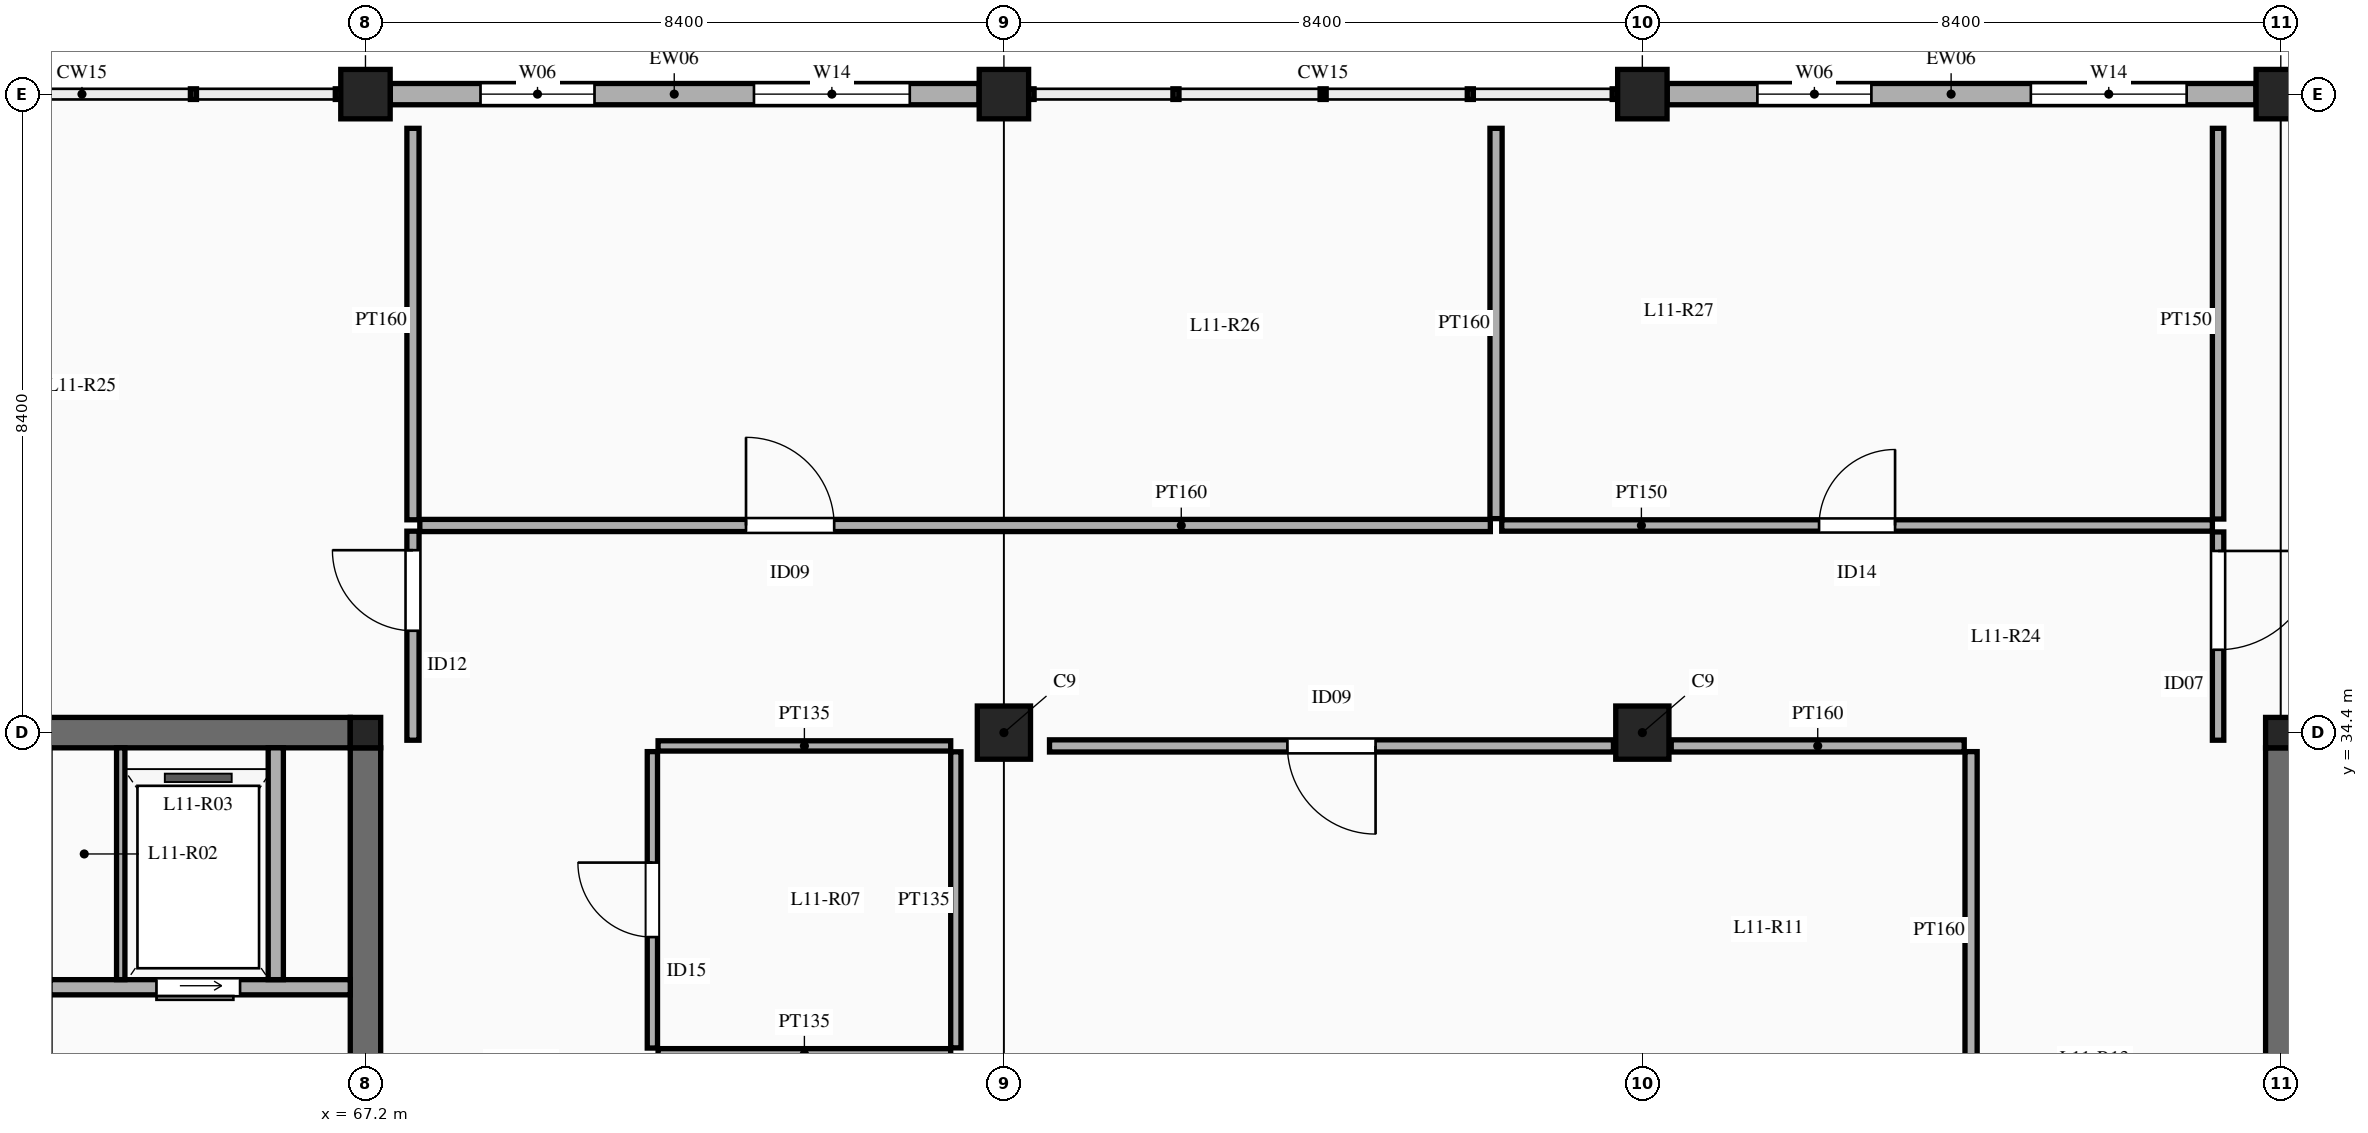
"""IFC4 building model, lengths in metres.
Left out: names, types, materials, properties, quantities, classifications, styles, units other than length and angle.
Written with IfcOpenShell. Run it as: python <this file> out.ifc"""

import sys

from ifc_helpers import new_model, si_unit, direction, frame, frame_2d, origin, origin_2d, place, context, subcontext, project, spatial, rectangle, extrude, element, fill, save


model = new_model("IFC4")
c1 = context("Model", 3, precision=1e-05, world=origin(), true_north=direction((0.0, 1.0)))
c2 = subcontext(c1, "Body", "Model", "MODEL_VIEW")
j1 = project(units=[si_unit("LENGTHUNIT", "METRE"), si_unit("PLANEANGLEUNIT", "RADIAN")], contexts=[c1])
p1 = place(None, origin())
s1 = spatial("IfcSite", under=j1, at=p1, CompositionType="ELEMENT")
p2 = place(p1, origin())
s2 = spatial("IfcBuilding", under=s1, at=p2, CompositionType="ELEMENT")
p3 = place(p2, frame((0.0, 0.0, 51.0)))
s3 = spatial("IfcBuildingStorey", under=s2, at=p3, CompositionType="ELEMENT", Elevation=51.0)
p4 = place(p3, frame((67.2, 34.4, 0.0), z_axis=(0.0, 0.0, 1.0), x_axis=(1.0, 0.0, 0.0)))
e1 = element("IfcColumn", 1, at=p4, inside=s3, PredefinedType="COLUMN", context=c2, shape_type="SweptSolid", body=[
    extrude(rectangle(XDim=0.4, YDim=0.4, at=origin_2d()), origin(), (0.0, 0.0, 1.0), 4.5),
])
p5 = place(p3, frame((67.2, 42.8, 0.0), z_axis=(0.0, 0.0, 1.0), x_axis=(1.0, 0.0, 0.0)))
e2 = element("IfcColumn", 2, at=p5, inside=s3, PredefinedType="COLUMN", context=c2, shape_type="SweptSolid", body=[
    extrude(rectangle(XDim=0.65, YDim=0.65, at=origin_2d()), origin(), (0.0, 0.0, 1.0), 4.5),
])
p6 = place(p3, frame((75.6, 34.4, 0.0), z_axis=(0.0, 0.0, 1.0), x_axis=(1.0, 0.0, 0.0)))
e3 = element("IfcColumn", 3, at=p6, inside=s3, PredefinedType="COLUMN", context=c2, shape_type="SweptSolid", body=[
    extrude(rectangle(XDim=0.7, YDim=0.7, at=origin_2d()), origin(), (0.0, 0.0, 1.0), 4.5),
])
p7 = place(p3, frame((75.6, 42.8, 0.0), z_axis=(0.0, 0.0, 1.0), x_axis=(1.0, 0.0, 0.0)))
e4 = element("IfcColumn", 4, at=p7, inside=s3, PredefinedType="COLUMN", context=c2, shape_type="SweptSolid", body=[
    extrude(rectangle(XDim=0.65, YDim=0.65, at=origin_2d()), origin(), (0.0, 0.0, 1.0), 4.5),
])
p8 = place(p3, frame((84.0, 34.4, 0.0), z_axis=(0.0, 0.0, 1.0), x_axis=(1.0, 0.0, 0.0)))
e5 = element("IfcColumn", 5, at=p8, inside=s3, PredefinedType="COLUMN", context=c2, shape_type="SweptSolid", body=[
    extrude(rectangle(XDim=0.7, YDim=0.7, at=origin_2d()), origin(), (0.0, 0.0, 1.0), 4.5),
])
p9 = place(p3, frame((84.0, 42.8, 0.0), z_axis=(0.0, 0.0, 1.0), x_axis=(1.0, 0.0, 0.0)))
e6 = element("IfcColumn", 6, at=p9, inside=s3, PredefinedType="COLUMN", context=c2, shape_type="SweptSolid", body=[
    extrude(rectangle(XDim=0.65, YDim=0.65, at=origin_2d()), origin(), (0.0, 0.0, 1.0), 4.5),
])
p10 = place(p3, frame((92.4, 34.4, 0.0), z_axis=(0.0, 0.0, 1.0), x_axis=(1.0, 0.0, 0.0)))
e7 = element("IfcColumn", 7, at=p10, inside=s3, PredefinedType="COLUMN", context=c2, shape_type="SweptSolid", body=[
    extrude(rectangle(XDim=0.4, YDim=0.4, at=origin_2d()), origin(), (0.0, 0.0, 1.0), 4.5),
])
p11 = place(p3, frame((92.4, 42.8, 0.0), z_axis=(0.0, 0.0, 1.0), x_axis=(1.0, 0.0, 0.0)))
e8 = element("IfcColumn", 8, at=p11, inside=s3, PredefinedType="COLUMN", context=c2, shape_type="SweptSolid", body=[
    extrude(rectangle(XDim=0.65, YDim=0.65, at=origin_2d()), origin(), (0.0, 0.0, 1.0), 4.5),
])
for number, where, z_axis, x_axis in (
    (9, (67.2, 26.2, 0.0), (0.0, 0.0, 1.0), (0.0, 1.0, 0.0)),
    (10, (59.0, 34.4, 0.0), (0.0, 0.0, 1.0), (1.0, 0.0, 0.0)),
    (11, (92.4, 26.2, 0.0), (0.0, 0.0, 1.0), (0.0, 1.0, 0.0)),
):
    element("IfcWall", number, at=place(p3, frame(where, z_axis=z_axis, x_axis=x_axis)), inside=s3, PredefinedType="SHEAR", context=c2, shape_type="SweptSolid", body=[
        extrude(rectangle(XDim=8.0, YDim=0.4, at=frame_2d((4.0, 0.0))), origin(), (0.0, 0.0, 1.0), 4.5),
    ])
p12 = place(p3, frame((67.527, 42.8, 0.0), z_axis=(0.0, 0.0, 1.0), x_axis=(1.0, 0.0, 0.0)))
e12 = element("IfcWall", 12, at=p12, inside=s3, PredefinedType="ELEMENTEDWALL", context=c2, shape_type="SweptSolid", body=[
    extrude(rectangle(XDim=7.746, YDim=0.28, at=frame_2d((3.873, 0.0))), origin(), (0.0, 0.0, 1.0), 3.55),
])
p13 = place(p12, frame((1.187, 0.0, 0.9)))
e13 = element("IfcOpeningElement", 13, at=p13, cuts=e12, PredefinedType="OPENING", context=c2, shape_type="SweptSolid", body=[
    extrude(rectangle(XDim=1.5, YDim=2.0, at=frame_2d((0.75, 1.0))), frame((0.0, 0.15, 0.0), z_axis=(0.0, -1.0, 0.0), x_axis=(1.0, 0.0, 0.0)), (0.0, 0.0, 1.0), 0.3),
])
p14 = place(p12, frame((4.784, 0.0, 0.9)))
e14 = element("IfcOpeningElement", 14, at=p14, cuts=e12, PredefinedType="OPENING", context=c2, shape_type="SweptSolid", body=[
    extrude(rectangle(XDim=2.05, YDim=2.1, at=frame_2d((1.025, 1.05))), frame((0.0, 0.15, 0.0), z_axis=(0.0, -1.0, 0.0), x_axis=(1.0, 0.0, 0.0)), (0.0, 0.0, 1.0), 0.3),
])
p15 = place(p3, frame((84.327, 42.8, 0.0), z_axis=(0.0, 0.0, 1.0), x_axis=(1.0, 0.0, 0.0)))
e15 = element("IfcWall", 15, at=p15, inside=s3, PredefinedType="ELEMENTEDWALL", context=c2, shape_type="SweptSolid", body=[
    extrude(rectangle(XDim=7.746, YDim=0.28, at=frame_2d((3.873, 0.0))), origin(), (0.0, 0.0, 1.0), 3.55),
])
p16 = place(p15, frame((1.187, 0.0, 0.9)))
e16 = element("IfcOpeningElement", 16, at=p16, cuts=e15, PredefinedType="OPENING", context=c2, shape_type="SweptSolid", body=[
    extrude(rectangle(XDim=1.5, YDim=2.0, at=frame_2d((0.75, 1.0))), frame((0.0, 0.15, 0.0), z_axis=(0.0, -1.0, 0.0), x_axis=(1.0, 0.0, 0.0)), (0.0, 0.0, 1.0), 0.3),
])
p17 = place(p15, frame((4.784, 0.0, 0.9)))
e17 = element("IfcOpeningElement", 17, at=p17, cuts=e15, PredefinedType="OPENING", context=c2, shape_type="SweptSolid", body=[
    extrude(rectangle(XDim=2.05, YDim=2.1, at=frame_2d((1.025, 1.05))), frame((0.0, 0.15, 0.0), z_axis=(0.0, -1.0, 0.0), x_axis=(1.0, 0.0, 0.0)), (0.0, 0.0, 1.0), 0.3),
])
p18 = place(p3, frame((63.05, 31.05, 0.0), z_axis=(0.0, 0.0, 1.0), x_axis=(1.0, 0.0, 0.0)))
e18 = element("IfcWall", 18, at=p18, inside=s3, PredefinedType="SOLIDWALL", context=c2, shape_type="SweptSolid", body=[
    extrude(rectangle(XDim=3.95, YDim=0.2, at=frame_2d((1.975, 0.0))), origin(), (0.0, 0.0, 1.0), 4.3),
])
p19 = place(p18, frame((1.4, 0.0, 0.0)))
e19 = element("IfcOpeningElement", 19, at=p19, cuts=e18, PredefinedType="OPENING", context=c2, shape_type="SweptSolid", body=[
    extrude(rectangle(XDim=1.1, YDim=2.15, at=frame_2d((0.55, 1.075))), frame((0.0, 0.11, 0.0), z_axis=(0.0, -1.0, 0.0), x_axis=(1.0, 0.0, 0.0)), (0.0, 0.0, 1.0), 0.22),
])
p20 = place(p3, frame((63.98, 31.15, 0.0), z_axis=(0.0, 0.0, 1.0), x_axis=(0.0, 1.0, 0.0)))
e20 = element("IfcWall", 20, at=p20, inside=s3, PredefinedType="PARTITIONING", context=c2, shape_type="SweptSolid", body=[
    extrude(rectangle(XDim=3.05, YDim=0.11, at=frame_2d((1.525, 0.0))), origin(), (0.0, 0.0, 1.0), 4.3),
])
p21 = place(p3, frame((66.02, 31.15, 0.0), z_axis=(0.0, 0.0, 1.0), x_axis=(0.0, 1.0, 0.0)))
e21 = element("IfcWall", 21, at=p21, inside=s3, PredefinedType="SOLIDWALL", context=c2, shape_type="SweptSolid", body=[
    extrude(rectangle(XDim=3.05, YDim=0.2, at=frame_2d((1.525, 0.0))), origin(), (0.0, 0.0, 1.0), 4.3),
])
p22 = place(p3, frame((70.975, 30.25, 0.0), z_axis=(0.0, 0.0, 1.0), x_axis=(0.0, 1.0, 0.0)))
e22 = element("IfcWall", 22, at=p22, inside=s3, PredefinedType="PARTITIONING", context=c2, shape_type="SweptSolid", body=[
    extrude(rectangle(XDim=3.9, YDim=0.135, at=frame_2d((1.95, 0.0))), origin(), (0.0, 0.0, 1.0), 3.45),
])
p23 = place(p22, frame((1.46, 0.0, 0.0)))
e23 = element("IfcOpeningElement", 23, at=p23, cuts=e22, PredefinedType="OPENING", context=c2, shape_type="SweptSolid", body=[
    extrude(rectangle(XDim=0.98, YDim=2.15, at=frame_2d((0.49, 1.075))), frame((0.0, 0.077, 0.0), z_axis=(0.0, -1.0, 0.0), x_axis=(1.0, 0.0, 0.0)), (0.0, 0.0, 1.0), 0.155),
])
for number, where, z_axis, x_axis in (
    (24, (71.05, 30.175, 0.0), (0.0, 0.0, 1.0), (1.0, 0.0, 0.0)),
    (25, (71.05, 34.225, 0.0), (0.0, 0.0, 1.0), (1.0, 0.0, 0.0)),
):
    element("IfcWall", number, at=place(p3, frame(where, z_axis=z_axis, x_axis=x_axis)), inside=s3, PredefinedType="PARTITIONING", context=c2, shape_type="SweptSolid", body=[
        extrude(rectangle(XDim=3.85, YDim=0.135, at=frame_2d((1.925, 0.0))), origin(), (0.0, 0.0, 1.0), 3.45),
    ])
p24 = place(p3, frame((88.325, 29.45, 0.0), z_axis=(0.0, 0.0, 1.0), x_axis=(0.0, 1.0, 0.0)))
e26 = element("IfcWall", 26, at=p24, inside=s3, PredefinedType="PARTITIONING", context=c2, shape_type="SweptSolid", body=[
    extrude(rectangle(XDim=4.7, YDim=0.16, at=frame_2d((2.35, 0.0))), origin(), (0.0, 0.0, 1.0), 3.45),
])
p25 = place(p3, frame((76.2, 34.225, 0.0), z_axis=(0.0, 0.0, 1.0), x_axis=(1.0, 0.0, 0.0)))
e27 = element("IfcWall", 27, at=p25, inside=s3, PredefinedType="PARTITIONING", context=c2, shape_type="SweptSolid", body=[
    extrude(rectangle(XDim=7.42, YDim=0.16, at=frame_2d((3.71, 0.0))), origin(), (0.0, 0.0, 1.0), 3.45),
])
p26 = place(p25, frame((3.13, 0.0, 0.0)))
e28 = element("IfcOpeningElement", 28, at=p26, cuts=e27, PredefinedType="OPENING", context=c2, shape_type="SweptSolid", body=[
    extrude(rectangle(XDim=1.16, YDim=2.2, at=frame_2d((0.58, 1.1))), frame((0.0, 0.09, 0.0), z_axis=(0.0, -1.0, 0.0), x_axis=(1.0, 0.0, 0.0)), (0.0, 0.0, 1.0), 0.18),
])
p27 = place(p3, frame((84.38, 34.225, 0.0), z_axis=(0.0, 0.0, 1.0), x_axis=(1.0, 0.0, 0.0)))
e29 = element("IfcWall", 29, at=p27, inside=s3, PredefinedType="PARTITIONING", context=c2, shape_type="SweptSolid", body=[
    extrude(rectangle(XDim=3.855, YDim=0.16, at=frame_2d((1.928, 0.0))), origin(), (0.0, 0.0, 1.0), 3.45),
])
p28 = place(p3, frame((67.825, 34.3, 0.0), z_axis=(0.0, 0.0, 1.0), x_axis=(0.0, 1.0, 0.0)))
e30 = element("IfcWall", 30, at=p28, inside=s3, PredefinedType="PARTITIONING", context=c2, shape_type="SweptSolid", body=[
    extrude(rectangle(XDim=2.75, YDim=0.16, at=frame_2d((1.375, 0.0))), origin(), (0.0, 0.0, 1.0), 3.45),
])
p29 = place(p28, frame((1.44, 0.0, 0.0)))
e31 = element("IfcOpeningElement", 31, at=p29, cuts=e30, PredefinedType="OPENING", context=c2, shape_type="SweptSolid", body=[
    extrude(rectangle(XDim=1.06, YDim=2.18, at=frame_2d((0.53, 1.09))), frame((0.0, 0.09, 0.0), z_axis=(0.0, -1.0, 0.0), x_axis=(1.0, 0.0, 0.0)), (0.0, 0.0, 1.0), 0.18),
])
p30 = place(p3, frame((67.915, 37.125, 0.0), z_axis=(0.0, 0.0, 1.0), x_axis=(1.0, 0.0, 0.0)))
e32 = element("IfcWall", 32, at=p30, inside=s3, PredefinedType="PARTITIONING", context=c2, shape_type="SweptSolid", body=[
    extrude(rectangle(XDim=14.085, YDim=0.16, at=frame_2d((7.042, 0.0))), origin(), (0.0, 0.0, 1.0), 3.45),
])
p31 = place(p30, frame((4.292, 0.0, 0.0)))
e33 = element("IfcOpeningElement", 33, at=p31, cuts=e32, PredefinedType="OPENING", context=c2, shape_type="SweptSolid", body=[
    extrude(rectangle(XDim=1.16, YDim=2.2, at=frame_2d((0.58, 1.1))), frame((0.0, 0.09, 0.0), z_axis=(0.0, -1.0, 0.0), x_axis=(1.0, 0.0, 0.0)), (0.0, 0.0, 1.0), 0.18),
])
p32 = place(p3, frame((82.15, 37.125, 0.0), z_axis=(0.0, 0.0, 1.0), x_axis=(1.0, 0.0, 0.0)))
e34 = element("IfcWall", 34, at=p32, inside=s3, PredefinedType="PARTITIONING", context=c2, shape_type="SweptSolid", body=[
    extrude(rectangle(XDim=9.35, YDim=0.15, at=frame_2d((4.675, 0.0))), origin(), (0.0, 0.0, 1.0), 3.45),
])
p33 = place(p32, frame((4.175, 0.0, 0.0)))
e35 = element("IfcOpeningElement", 35, at=p33, cuts=e34, PredefinedType="OPENING", context=c2, shape_type="SweptSolid", body=[
    extrude(rectangle(XDim=1.0, YDim=2.15, at=frame_2d((0.5, 1.075))), frame((0.0, 0.085, 0.0), z_axis=(0.0, -1.0, 0.0), x_axis=(1.0, 0.0, 0.0)), (0.0, 0.0, 1.0), 0.17),
])
p34 = place(p3, frame((91.575, 34.3, 0.0), z_axis=(0.0, 0.0, 1.0), x_axis=(0.0, 1.0, 0.0)))
e36 = element("IfcWall", 36, at=p34, inside=s3, PredefinedType="PARTITIONING", context=c2, shape_type="SweptSolid", body=[
    extrude(rectangle(XDim=2.74, YDim=0.15, at=frame_2d((1.37, 0.0))), origin(), (0.0, 0.0, 1.0), 3.45),
])
p35 = place(p34, frame((1.19, 0.0, 0.0)))
e37 = element("IfcOpeningElement", 37, at=p35, cuts=e36, PredefinedType="OPENING", context=c2, shape_type="SweptSolid", body=[
    extrude(rectangle(XDim=1.3, YDim=2.25, at=frame_2d((0.65, 1.125))), frame((0.0, 0.085, 0.0), z_axis=(0.0, -1.0, 0.0), x_axis=(1.0, 0.0, 0.0)), (0.0, 0.0, 1.0), 0.17),
])
p36 = place(p3, frame((67.825, 37.2, 0.0), z_axis=(0.0, 0.0, 1.0), x_axis=(0.0, 1.0, 0.0)))
e38 = element("IfcWall", 38, at=p36, inside=s3, PredefinedType="PARTITIONING", context=c2, shape_type="SweptSolid", body=[
    extrude(rectangle(XDim=5.15, YDim=0.16, at=frame_2d((2.575, 0.0))), origin(), (0.0, 0.0, 1.0), 3.45),
])
p37 = place(p3, frame((82.075, 37.215, 0.0), z_axis=(0.0, 0.0, 1.0), x_axis=(0.0, 1.0, 0.0)))
e39 = element("IfcWall", 39, at=p37, inside=s3, PredefinedType="PARTITIONING", context=c2, shape_type="SweptSolid", body=[
    extrude(rectangle(XDim=5.135, YDim=0.16, at=frame_2d((2.567, 0.0))), origin(), (0.0, 0.0, 1.0), 3.45),
])
p38 = place(p3, frame((91.575, 37.21, 0.0), z_axis=(0.0, 0.0, 1.0), x_axis=(0.0, 1.0, 0.0)))
e40 = element("IfcWall", 40, at=p38, inside=s3, PredefinedType="PARTITIONING", context=c2, shape_type="SweptSolid", body=[
    extrude(rectangle(XDim=5.14, YDim=0.15, at=frame_2d((2.57, 0.0))), origin(), (0.0, 0.0, 1.0), 3.45),
])
p39 = place(p3, frame((74.968, 30.252, 0.0), z_axis=(0.0, 0.0, 1.0), x_axis=(0.0, 1.0, 0.0)))
e41 = element("IfcWall", 41, at=p39, inside=s3, PredefinedType="PARTITIONING", context=c2, shape_type="SweptSolid", body=[
    extrude(rectangle(XDim=3.895, YDim=0.135, at=frame_2d((1.948, 0.0))), origin(), (0.0, 0.0, 1.0), 3.45),
])
p40 = place(p13, origin())
e42 = element("IfcWindow", 42, at=p40, inside=s3, PartitioningType="DOUBLE_PANEL_VERTICAL", PredefinedType="WINDOW", context=c2, shape_type="SweptSolid", body=[
    extrude(rectangle(XDim=1.5, YDim=2.0, at=frame_2d((0.75, 1.0))), frame((0.0, 0.03, 0.0), z_axis=(0.0, -1.0, 0.0), x_axis=(1.0, 0.0, 0.0)), (0.0, 0.0, 1.0), 0.06),
])
fill(e13, e42)
p41 = place(p14, origin())
e43 = element("IfcWindow", 43, at=p41, inside=s3, PartitioningType="TRIPLE_PANEL_VERTICAL", PredefinedType="WINDOW", context=c2, shape_type="SweptSolid", body=[
    extrude(rectangle(XDim=2.05, YDim=2.1, at=frame_2d((1.025, 1.05))), frame((0.0, 0.03, 0.0), z_axis=(0.0, -1.0, 0.0), x_axis=(1.0, 0.0, 0.0)), (0.0, 0.0, 1.0), 0.06),
])
fill(e14, e43)
p42 = place(p16, origin())
e44 = element("IfcWindow", 44, at=p42, inside=s3, PartitioningType="DOUBLE_PANEL_VERTICAL", PredefinedType="WINDOW", context=c2, shape_type="SweptSolid", body=[
    extrude(rectangle(XDim=1.5, YDim=2.0, at=frame_2d((0.75, 1.0))), frame((0.0, 0.03, 0.0), z_axis=(0.0, -1.0, 0.0), x_axis=(1.0, 0.0, 0.0)), (0.0, 0.0, 1.0), 0.06),
])
fill(e16, e44)
p43 = place(p17, origin())
e45 = element("IfcWindow", 45, at=p43, inside=s3, PartitioningType="TRIPLE_PANEL_VERTICAL", PredefinedType="WINDOW", context=c2, shape_type="SweptSolid", body=[
    extrude(rectangle(XDim=2.05, YDim=2.1, at=frame_2d((1.025, 1.05))), frame((0.0, 0.03, 0.0), z_axis=(0.0, -1.0, 0.0), x_axis=(1.0, 0.0, 0.0)), (0.0, 0.0, 1.0), 0.06),
])
fill(e17, e45)
p44 = place(p19, frame((1.1, 0.0, 0.0), z_axis=(0.0, 0.0, 1.0), x_axis=(-1.0, 0.0, 0.0)))
e46 = element("IfcDoor", 46, at=p44, inside=s3, OperationType="SLIDING_TO_LEFT", PredefinedType="DOOR", context=c2, shape_type="SweptSolid", body=[
    extrude(rectangle(XDim=1.1, YDim=2.15, at=frame_2d((0.55, 1.075))), frame((0.0, 0.025, 0.0), z_axis=(0.0, -1.0, 0.0), x_axis=(1.0, 0.0, 0.0)), (0.0, 0.0, 1.0), 0.05),
])
fill(e19, e46)
p45 = place(p23, origin())
e47 = element("IfcDoor", 47, at=p45, inside=s3, OperationType="SINGLE_SWING_RIGHT", PredefinedType="DOOR", context=c2, shape_type="SweptSolid", body=[
    extrude(rectangle(XDim=0.98, YDim=2.15, at=frame_2d((0.49, 1.075))), frame((0.0, 0.025, 0.0), z_axis=(0.0, -1.0, 0.0), x_axis=(1.0, 0.0, 0.0)), (0.0, 0.0, 1.0), 0.05),
])
fill(e23, e47)
p46 = place(p26, frame((1.16, 0.0, 0.0), z_axis=(0.0, 0.0, 1.0), x_axis=(-1.0, 0.0, 0.0)))
e48 = element("IfcDoor", 48, at=p46, inside=s3, OperationType="SINGLE_SWING_LEFT", PredefinedType="DOOR", context=c2, shape_type="SweptSolid", body=[
    extrude(rectangle(XDim=1.16, YDim=2.2, at=frame_2d((0.58, 1.1))), frame((0.0, 0.025, 0.0), z_axis=(0.0, -1.0, 0.0), x_axis=(1.0, 0.0, 0.0)), (0.0, 0.0, 1.0), 0.05),
])
fill(e28, e48)
p47 = place(p29, origin())
e49 = element("IfcDoor", 49, at=p47, inside=s3, OperationType="SINGLE_SWING_RIGHT", PredefinedType="DOOR", context=c2, shape_type="SweptSolid", body=[
    extrude(rectangle(XDim=1.06, YDim=2.18, at=frame_2d((0.53, 1.09))), frame((0.0, 0.025, 0.0), z_axis=(0.0, -1.0, 0.0), x_axis=(1.0, 0.0, 0.0)), (0.0, 0.0, 1.0), 0.05),
])
fill(e31, e49)
p48 = place(p31, origin())
e50 = element("IfcDoor", 50, at=p48, inside=s3, OperationType="SINGLE_SWING_LEFT", PredefinedType="DOOR", context=c2, shape_type="SweptSolid", body=[
    extrude(rectangle(XDim=1.16, YDim=2.2, at=frame_2d((0.58, 1.1))), frame((0.0, 0.025, 0.0), z_axis=(0.0, -1.0, 0.0), x_axis=(1.0, 0.0, 0.0)), (0.0, 0.0, 1.0), 0.05),
])
fill(e33, e50)
p49 = place(p33, origin())
e51 = element("IfcDoor", 51, at=p49, inside=s3, OperationType="SINGLE_SWING_RIGHT", PredefinedType="DOOR", context=c2, shape_type="SweptSolid", body=[
    extrude(rectangle(XDim=1.0, YDim=2.15, at=frame_2d((0.5, 1.075))), frame((0.0, 0.025, 0.0), z_axis=(0.0, -1.0, 0.0), x_axis=(1.0, 0.0, 0.0)), (0.0, 0.0, 1.0), 0.05),
])
fill(e35, e51)
p50 = place(p35, frame((1.3, 0.0, 0.0), z_axis=(0.0, 0.0, 1.0), x_axis=(-1.0, 0.0, 0.0)))
e52 = element("IfcDoor", 52, at=p50, inside=s3, OperationType="SINGLE_SWING_LEFT", PredefinedType="DOOR", context=c2, shape_type="SweptSolid", body=[
    extrude(rectangle(XDim=1.3, YDim=2.25, at=frame_2d((0.65, 1.125))), frame((0.0, 0.025, 0.0), z_axis=(0.0, -1.0, 0.0), x_axis=(1.0, 0.0, 0.0)), (0.0, 0.0, 1.0), 0.05),
])
fill(e37, e52)
save(model, sys.argv[1])
